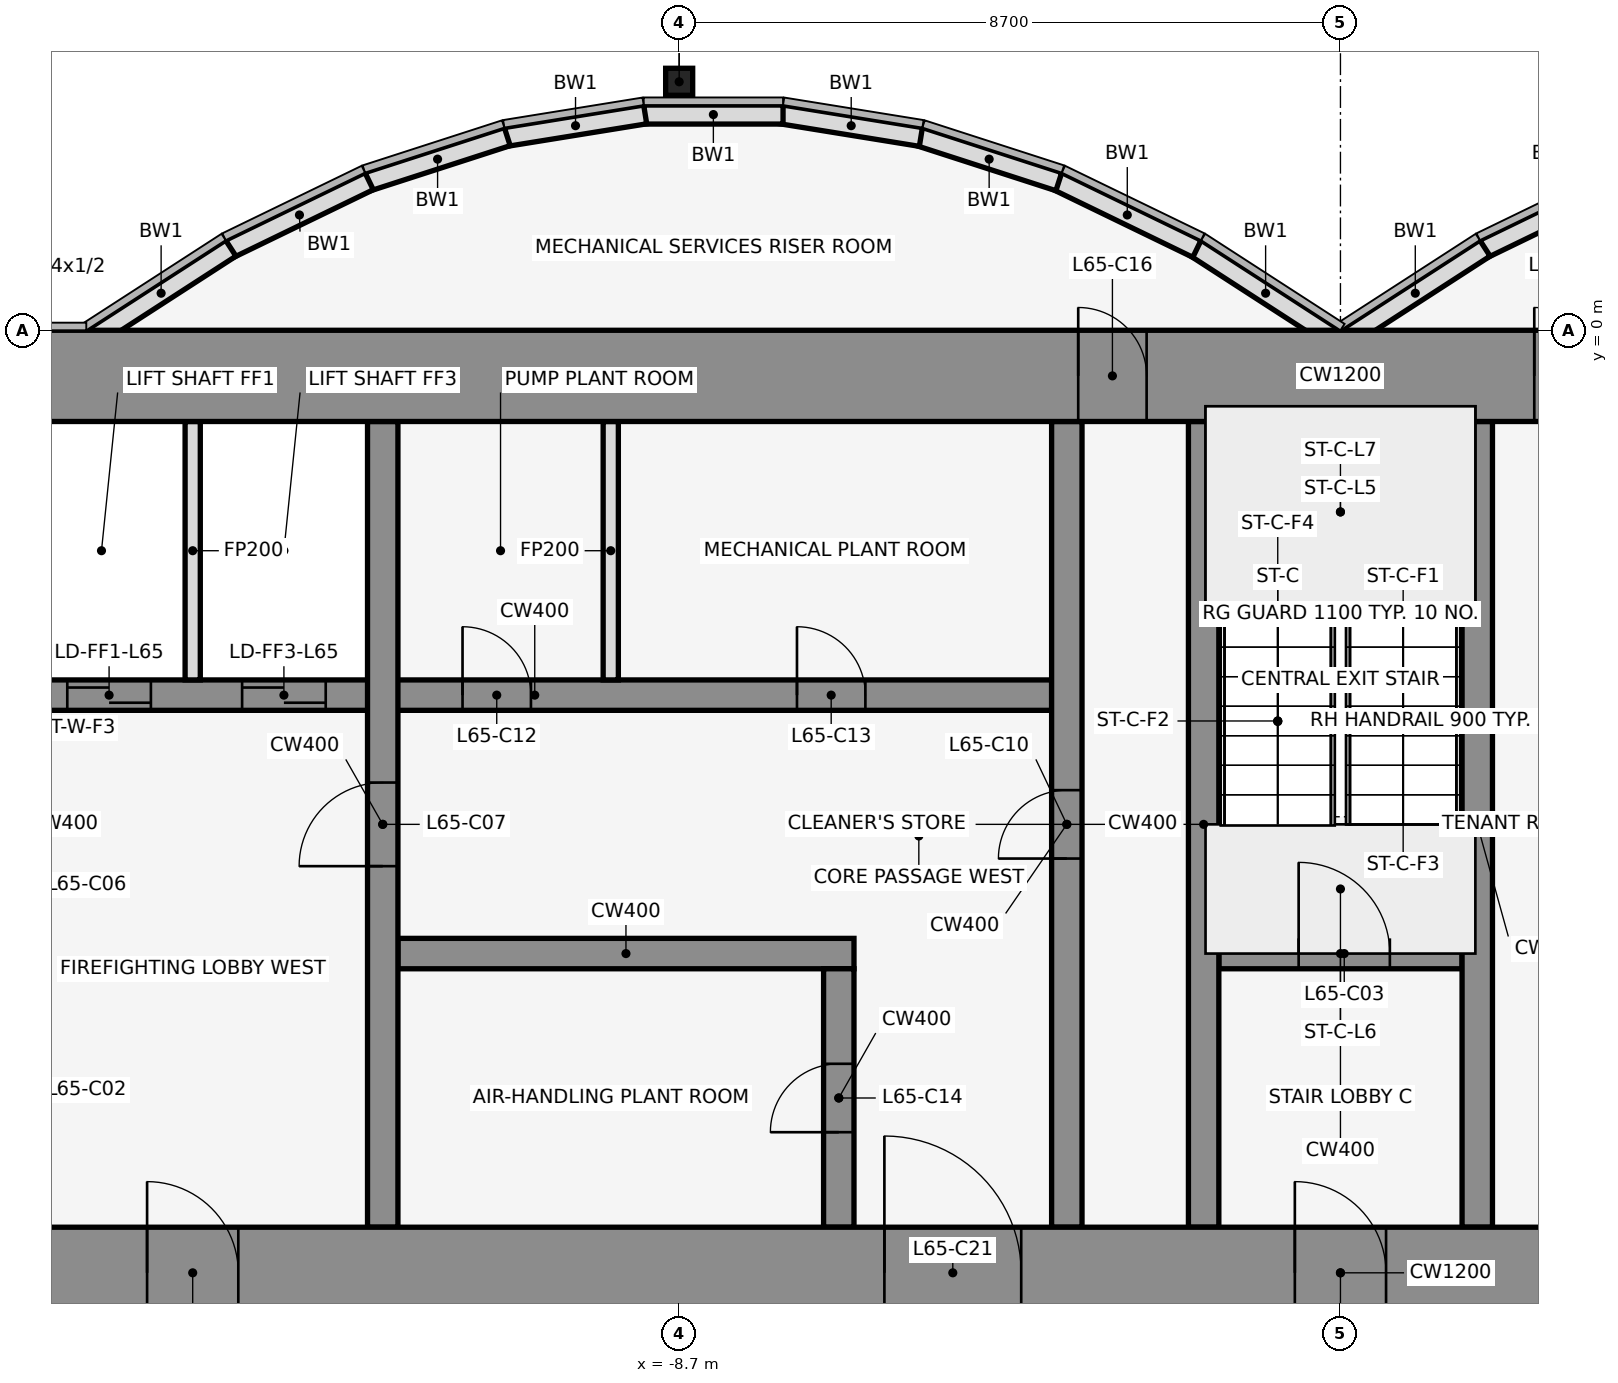
"""IFC4 building model, lengths in metres.
Left out: names, types, materials, properties, quantities, classifications, styles, units other than length and angle.
Written with IfcOpenShell. Run it as: python <this file> out.ifc"""

import sys

from ifc_helpers import new_model, si_unit, direction, frame, frame_2d, origin, origin_2d, place, context, subcontext, project, spatial, rectangle, hollow_rectangle, extrude, element, fill, save


model = new_model("IFC4")
c1 = context("Model", 3, precision=1e-05, world=origin(), true_north=direction((0.0, 1.0)))
c2 = subcontext(c1, "Body", "Model", "MODEL_VIEW")
j1 = project(units=[si_unit("LENGTHUNIT", "METRE"), si_unit("PLANEANGLEUNIT", "RADIAN")], contexts=[c1])
p1 = place(None, origin())
s1 = spatial("IfcSite", under=j1, at=p1, CompositionType="ELEMENT")
p2 = place(p1, origin())
s2 = spatial("IfcBuilding", under=s1, at=p2, CompositionType="ELEMENT")
p3 = place(p2, frame((0.0, 0.0, 287.6)))
s3 = spatial("IfcBuildingStorey", under=s2, at=p3, CompositionType="ELEMENT", Elevation=287.6)
p4 = place(p3, frame((-8.7, 3.269, 0.0), z_axis=(0.0, 0.0, 1.0), x_axis=(1.0, 0.0, 0.0)))
e1 = element("IfcColumn", 1, at=p4, inside=s3, PredefinedType="COLUMN", context=c2, shape_type="SweptSolid", body=[
    extrude(hollow_rectangle(XDim=0.356, YDim=0.356, WallThickness=0.012, at=origin_2d()), origin(), (0.0, 0.0, 1.0), 5.4),
])
p5 = place(p3, frame((3.721, 1.962, 0.0), z_axis=(0.0, 0.0, 1.0), x_axis=(-0.89982408427, -0.436252928206, 0.0)))
e2 = element("IfcWall", 2, at=p5, inside=s3, PredefinedType="STANDARD", context=c2, shape_type="SweptSolid", body=[
    extrude(rectangle(XDim=2.038, YDim=0.25, at=frame_2d((1.019, 0.0))), origin(), (0.0, 0.0, 1.0), 5.25),
])
for number, where, z_axis, x_axis in (
    (3, (1.901, 1.08, 0.0), (0.0, 0.0, 1.0), (-0.84, -0.543, 0.0)),
    (4, (-0.068, -0.105, 0.0), (0.0, 0.0, 1.0), (-0.84, 0.543, 0.0)),
):
    element("IfcWall", number, at=place(p3, frame(where, z_axis=z_axis, x_axis=x_axis)), inside=s3, PredefinedType="STANDARD", context=c2, shape_type="SweptSolid", body=[
        extrude(rectangle(XDim=2.183, YDim=0.25, at=frame_2d((1.091, 0.0))), origin(), (0.0, 0.0, 1.0), 5.25),
    ])
p6 = place(p3, frame((-1.888, 1.073, 0.0), z_axis=(0.0, 0.0, 1.0), x_axis=(-0.89982408427, 0.436252928206, 0.0)))
e5 = element("IfcWall", 5, at=p6, inside=s3, PredefinedType="STANDARD", context=c2, shape_type="SweptSolid", body=[
    extrude(rectangle(XDim=2.038, YDim=0.25, at=frame_2d((1.019, 0.0))), origin(), (0.0, 0.0, 1.0), 5.25),
])
p7 = place(p3, frame((-3.705, 1.955, 0.0), z_axis=(0.0, 0.0, 1.0), x_axis=(-0.951495806175, 0.307661714928, 0.0)))
e6 = element("IfcWall", 6, at=p7, inside=s3, PredefinedType="STANDARD", context=c2, shape_type="SweptSolid", body=[
    extrude(rectangle(XDim=1.927, YDim=0.25, at=frame_2d((0.963, 0.0))), origin(), (0.0, 0.0, 1.0), 5.25),
])
p8 = place(p3, frame((-5.52, 2.543, 0.0), z_axis=(0.0, 0.0, 1.0), x_axis=(-0.987181718931, 0.159600293885, 0.0)))
e7 = element("IfcWall", 7, at=p8, inside=s3, PredefinedType="STANDARD", context=c2, shape_type="SweptSolid", body=[
    extrude(rectangle(XDim=1.857, YDim=0.25, at=frame_2d((0.929, 0.0))), origin(), (0.0, 0.0, 1.0), 5.25),
])
p9 = place(p3, frame((-7.333, 2.838, 0.0), z_axis=(0.0, 0.0, 1.0), x_axis=(-1.0, 0.0, 0.0)))
e8 = element("IfcWall", 8, at=p9, inside=s3, PredefinedType="STANDARD", context=c2, shape_type="SweptSolid", body=[
    extrude(rectangle(XDim=1.833, YDim=0.25, at=frame_2d((0.917, 0.0))), origin(), (0.0, 0.0, 1.0), 5.25),
])
p10 = place(p3, frame((-9.147, 2.84, 0.0), z_axis=(0.0, 0.0, 1.0), x_axis=(-0.987181718931, -0.159600293885, 0.0)))
e9 = element("IfcWall", 9, at=p10, inside=s3, PredefinedType="STANDARD", context=c2, shape_type="SweptSolid", body=[
    extrude(rectangle(XDim=1.857, YDim=0.25, at=frame_2d((0.929, 0.0))), origin(), (0.0, 0.0, 1.0), 5.25),
])
p11 = place(p3, frame((-10.962, 2.548, 0.0), z_axis=(0.0, 0.0, 1.0), x_axis=(-0.951495806175, -0.307661714928, 0.0)))
e10 = element("IfcWall", 10, at=p11, inside=s3, PredefinedType="STANDARD", context=c2, shape_type="SweptSolid", body=[
    extrude(rectangle(XDim=1.927, YDim=0.25, at=frame_2d((0.963, 0.0))), origin(), (0.0, 0.0, 1.0), 5.25),
])
p12 = place(p3, frame((-12.779, 1.962, 0.0), z_axis=(0.0, 0.0, 1.0), x_axis=(-0.89982408427, -0.436252928206, 0.0)))
e11 = element("IfcWall", 11, at=p12, inside=s3, PredefinedType="STANDARD", context=c2, shape_type="SweptSolid", body=[
    extrude(rectangle(XDim=2.038, YDim=0.25, at=frame_2d((1.019, 0.0))), origin(), (0.0, 0.0, 1.0), 5.25),
])
p13 = place(p3, frame((-14.599, 1.08, 0.0), z_axis=(0.0, 0.0, 1.0), x_axis=(-0.83981312244, -0.542875602121, 0.0)))
e12 = element("IfcWall", 12, at=p13, inside=s3, PredefinedType="STANDARD", context=c2, shape_type="SweptSolid", body=[
    extrude(rectangle(XDim=2.183, YDim=0.25, at=frame_2d((1.091, 0.0))), origin(), (0.0, 0.0, 1.0), 5.25),
])
p14 = place(p3, frame((-12.4, -8.2, 0.0), z_axis=(0.0, 0.0, 1.0), x_axis=(1.0, 0.0, 0.0)))
e13 = element("IfcWall", 13, at=p14, inside=s3, PredefinedType="SHEAR", context=c2, shape_type="SweptSolid", body=[
    extrude(rectangle(XDim=6.0, YDim=0.4, at=frame_2d((3.0, 0.0))), origin(), (0.0, 0.0, 1.0), 5.4),
])
p15 = place(p3, frame((-1.6, -8.2, 0.0), z_axis=(0.0, 0.0, 1.0), x_axis=(1.0, 0.0, 0.0)))
e14 = element("IfcWall", 14, at=p15, inside=s3, PredefinedType="SHEAR", context=c2, shape_type="SweptSolid", body=[
    extrude(rectangle(XDim=3.2, YDim=0.4, at=frame_2d((1.6, 0.0))), origin(), (0.0, 0.0, 1.0), 5.4),
])
p16 = place(p15, frame((1.05, 0.0, 0.0)))
e15 = element("IfcOpeningElement", 15, at=p16, cuts=e14, PredefinedType="OPENING", context=c2, shape_type="SweptSolid", body=[
    extrude(rectangle(XDim=1.2, YDim=2.1, at=frame_2d((0.6, 1.05))), frame((0.0, 0.212, 0.0), z_axis=(0.0, -1.0, 0.0), x_axis=(1.0, 0.0, 0.0)), (0.0, 0.0, 1.0), 0.424),
])
p17 = place(p3, frame((-17.4, -4.8, 0.0), z_axis=(0.0, 0.0, 1.0), x_axis=(1.0, 0.0, 0.0)))
e16 = element("IfcWall", 16, at=p17, inside=s3, PredefinedType="SHEAR", context=c2, shape_type="SweptSolid", body=[
    extrude(rectangle(XDim=13.6, YDim=0.4, at=frame_2d((6.8, 0.0))), origin(), (0.0, 0.0, 1.0), 5.4),
])
p18 = place(p17, frame((0.65, 0.0, 0.0)))
e17 = element("IfcOpeningElement", 17, at=p18, cuts=e16, PredefinedType="OPENING", context=c2, shape_type="SweptSolid", body=[
    extrude(rectangle(XDim=1.1, YDim=2.1, at=frame_2d((0.55, 1.05))), frame((0.0, 0.212, 0.0), z_axis=(0.0, -1.0, 0.0), x_axis=(1.0, 0.0, 0.0)), (0.0, 0.0, 1.0), 0.424),
])
p19 = place(p17, frame((2.95, 0.0, 0.0)))
e18 = element("IfcOpeningElement", 18, at=p19, cuts=e16, PredefinedType="OPENING", context=c2, shape_type="SweptSolid", body=[
    extrude(rectangle(XDim=1.1, YDim=2.1, at=frame_2d((0.55, 1.05))), frame((0.0, 0.212, 0.0), z_axis=(0.0, -1.0, 0.0), x_axis=(1.0, 0.0, 0.0)), (0.0, 0.0, 1.0), 0.424),
])
p20 = place(p17, frame((5.85, 0.0, 0.0)))
e19 = element("IfcOpeningElement", 19, at=p20, cuts=e16, PredefinedType="OPENING", context=c2, shape_type="SweptSolid", body=[
    extrude(rectangle(XDim=0.9, YDim=2.1, at=frame_2d((0.45, 1.05))), frame((0.0, 0.212, 0.0), z_axis=(0.0, -1.0, 0.0), x_axis=(1.0, 0.0, 0.0)), (0.0, 0.0, 1.0), 0.424),
])
p21 = place(p17, frame((10.25, 0.0, 0.0)))
e20 = element("IfcOpeningElement", 20, at=p21, cuts=e16, PredefinedType="OPENING", context=c2, shape_type="SweptSolid", body=[
    extrude(rectangle(XDim=0.9, YDim=2.1, at=frame_2d((0.45, 1.05))), frame((0.0, 0.212, 0.0), z_axis=(0.0, -1.0, 0.0), x_axis=(1.0, 0.0, 0.0)), (0.0, 0.0, 1.0), 0.424),
])
p22 = place(p3, frame((-15.1, -4.6, 0.0), z_axis=(0.0, 0.0, 1.0), x_axis=(0.0, 1.0, 0.0)))
e21 = element("IfcWall", 21, at=p22, inside=s3, PredefinedType="PARTITIONING", context=c2, shape_type="SweptSolid", body=[
    extrude(rectangle(XDim=3.4, YDim=0.2, at=frame_2d((1.7, 0.0))), origin(), (0.0, 0.0, 1.0), 4.318),
])
p23 = place(p3, frame((-12.6, -11.8, 0.0), z_axis=(0.0, 0.0, 1.0), x_axis=(0.0, 1.0, 0.0)))
e22 = element("IfcWall", 22, at=p23, inside=s3, PredefinedType="SHEAR", context=c2, shape_type="SweptSolid", body=[
    extrude(rectangle(XDim=10.6, YDim=0.4, at=frame_2d((5.3, 0.0))), origin(), (0.0, 0.0, 1.0), 5.4),
])
p24 = place(p23, frame((4.75, 0.0, 0.0)))
e23 = element("IfcOpeningElement", 23, at=p24, cuts=e22, PredefinedType="OPENING", context=c2, shape_type="SweptSolid", body=[
    extrude(rectangle(XDim=1.1, YDim=2.1, at=frame_2d((0.55, 1.05))), frame((0.0, 0.212, 0.0), z_axis=(0.0, -1.0, 0.0), x_axis=(1.0, 0.0, 0.0)), (0.0, 0.0, 1.0), 0.424),
])
p25 = place(p3, frame((-9.6, -4.6, 0.0), z_axis=(0.0, 0.0, 1.0), x_axis=(0.0, 1.0, 0.0)))
e24 = element("IfcWall", 24, at=p25, inside=s3, PredefinedType="PARTITIONING", context=c2, shape_type="SweptSolid", body=[
    extrude(rectangle(XDim=3.4, YDim=0.2, at=frame_2d((1.7, 0.0))), origin(), (0.0, 0.0, 1.0), 4.318),
])
p26 = place(p3, frame((-6.6, -11.8, 0.0), z_axis=(0.0, 0.0, 1.0), x_axis=(0.0, 1.0, 0.0)))
e25 = element("IfcWall", 25, at=p26, inside=s3, PredefinedType="SHEAR", context=c2, shape_type="SweptSolid", body=[
    extrude(rectangle(XDim=3.4, YDim=0.4, at=frame_2d((1.7, 0.0))), origin(), (0.0, 0.0, 1.0), 5.4),
])
p27 = place(p26, frame((1.25, 0.0, 0.0)))
e26 = element("IfcOpeningElement", 26, at=p27, cuts=e25, PredefinedType="OPENING", context=c2, shape_type="SweptSolid", body=[
    extrude(rectangle(XDim=0.9, YDim=2.1, at=frame_2d((0.45, 1.05))), frame((0.0, 0.212, 0.0), z_axis=(0.0, -1.0, 0.0), x_axis=(1.0, 0.0, 0.0)), (0.0, 0.0, 1.0), 0.424),
])
p28 = place(p3, frame((-3.6, -11.8, 0.0), z_axis=(0.0, 0.0, 1.0), x_axis=(0.0, 1.0, 0.0)))
e27 = element("IfcWall", 27, at=p28, inside=s3, PredefinedType="SHEAR", context=c2, shape_type="SweptSolid", body=[
    extrude(rectangle(XDim=10.6, YDim=0.4, at=frame_2d((5.3, 0.0))), origin(), (0.0, 0.0, 1.0), 5.4),
])
p29 = place(p28, frame((4.85, 0.0, 0.0)))
e28 = element("IfcOpeningElement", 28, at=p29, cuts=e27, PredefinedType="OPENING", context=c2, shape_type="SweptSolid", body=[
    extrude(rectangle(XDim=0.9, YDim=2.1, at=frame_2d((0.45, 1.05))), frame((0.0, 0.212, 0.0), z_axis=(0.0, -1.0, 0.0), x_axis=(1.0, 0.0, 0.0)), (0.0, 0.0, 1.0), 0.424),
])
for number, where, z_axis, x_axis in (
    (29, (-1.8, -11.8, 0.0), (0.0, 0.0, 1.0), (0.0, 1.0, 0.0)),
    (30, (1.8, -11.8, 0.0), (0.0, 0.0, 1.0), (0.0, 1.0, 0.0)),
):
    element("IfcWall", number, at=place(p3, frame(where, z_axis=z_axis, x_axis=x_axis)), inside=s3, PredefinedType="SHEAR", context=c2, shape_type="SweptSolid", body=[
        extrude(rectangle(XDim=10.6, YDim=0.4, at=frame_2d((5.3, 0.0))), origin(), (0.0, 0.0, 1.0), 5.4),
    ])
p30 = place(p3, frame((-22.0, -0.6, 0.0), z_axis=(0.0, 0.0, 1.0), x_axis=(1.0, 0.0, 0.0)))
e31 = element("IfcWall", 31, at=p30, inside=s3, PredefinedType="SHEAR", context=c2, shape_type="SweptSolid", body=[
    extrude(rectangle(XDim=44.0, YDim=1.2, at=frame_2d((22.0, 0.0))), origin(), (0.0, 0.0, 1.0), 5.4),
])
p31 = place(p30, frame((18.55, 0.0, 0.0)))
e32 = element("IfcOpeningElement", 32, at=p31, cuts=e31, PredefinedType="OPENING", context=c2, shape_type="SweptSolid", body=[
    extrude(rectangle(XDim=0.9, YDim=2.1, at=frame_2d((0.45, 1.05))), frame((0.0, 0.612, 0.0), z_axis=(0.0, -1.0, 0.0), x_axis=(1.0, 0.0, 0.0)), (0.0, 0.0, 1.0), 1.224),
])
p32 = place(p30, frame((24.55, 0.0, 0.0)))
e33 = element("IfcOpeningElement", 33, at=p32, cuts=e31, PredefinedType="OPENING", context=c2, shape_type="SweptSolid", body=[
    extrude(rectangle(XDim=0.9, YDim=2.1, at=frame_2d((0.45, 1.05))), frame((0.0, 0.612, 0.0), z_axis=(0.0, -1.0, 0.0), x_axis=(1.0, 0.0, 0.0)), (0.0, 0.0, 1.0), 1.224),
])
p33 = place(p3, frame((-22.0, -12.4, 0.0), z_axis=(0.0, 0.0, 1.0), x_axis=(1.0, 0.0, 0.0)))
e34 = element("IfcWall", 34, at=p33, inside=s3, PredefinedType="SHEAR", context=c2, shape_type="SweptSolid", body=[
    extrude(rectangle(XDim=44.0, YDim=1.2, at=frame_2d((22.0, 0.0))), origin(), (0.0, 0.0, 1.0), 5.4),
])
p34 = place(p33, frame((2.2, 0.0, 0.0)))
e35 = element("IfcOpeningElement", 35, at=p34, cuts=e34, PredefinedType="OPENING", context=c2, shape_type="SweptSolid", body=[
    extrude(rectangle(XDim=1.2, YDim=2.1, at=frame_2d((0.6, 1.05))), frame((0.0, 0.612, 0.0), z_axis=(0.0, -1.0, 0.0), x_axis=(1.0, 0.0, 0.0)), (0.0, 0.0, 1.0), 1.224),
])
p35 = place(p33, frame((21.4, 0.0, 0.0)))
e36 = element("IfcOpeningElement", 36, at=p35, cuts=e34, PredefinedType="OPENING", context=c2, shape_type="SweptSolid", body=[
    extrude(rectangle(XDim=1.2, YDim=2.1, at=frame_2d((0.6, 1.05))), frame((0.0, 0.612, 0.0), z_axis=(0.0, -1.0, 0.0), x_axis=(1.0, 0.0, 0.0)), (0.0, 0.0, 1.0), 1.224),
])
p36 = place(p33, frame((40.6, 0.0, 0.0)))
e37 = element("IfcOpeningElement", 37, at=p36, cuts=e34, PredefinedType="OPENING", context=c2, shape_type="SweptSolid", body=[
    extrude(rectangle(XDim=1.2, YDim=2.1, at=frame_2d((0.6, 1.05))), frame((0.0, 0.612, 0.0), z_axis=(0.0, -1.0, 0.0), x_axis=(1.0, 0.0, 0.0)), (0.0, 0.0, 1.0), 1.224),
])
p37 = place(p33, frame((16.0, 0.0, 0.0)))
e38 = element("IfcOpeningElement", 38, at=p37, cuts=e34, PredefinedType="OPENING", context=c2, shape_type="SweptSolid", body=[
    extrude(rectangle(XDim=1.8, YDim=2.1, at=frame_2d((0.9, 1.05))), frame((0.0, 0.612, 0.0), z_axis=(0.0, -1.0, 0.0), x_axis=(1.0, 0.0, 0.0)), (0.0, 0.0, 1.0), 1.224),
])
p38 = place(p33, frame((6.3, 0.0, 0.0)))
e39 = element("IfcOpeningElement", 39, at=p38, cuts=e34, PredefinedType="OPENING", context=c2, shape_type="SweptSolid", body=[
    extrude(rectangle(XDim=1.2, YDim=2.1, at=frame_2d((0.6, 1.05))), frame((0.0, 0.612, 0.0), z_axis=(0.0, -1.0, 0.0), x_axis=(1.0, 0.0, 0.0)), (0.0, 0.0, 1.0), 1.224),
])
p39 = place(p33, frame((26.2, 0.0, 0.0)))
e40 = element("IfcOpeningElement", 40, at=p39, cuts=e34, PredefinedType="OPENING", context=c2, shape_type="SweptSolid", body=[
    extrude(rectangle(XDim=1.8, YDim=2.1, at=frame_2d((0.9, 1.05))), frame((0.0, 0.612, 0.0), z_axis=(0.0, -1.0, 0.0), x_axis=(1.0, 0.0, 0.0)), (0.0, 0.0, 1.0), 1.224),
])
p40 = place(p33, frame((36.5, 0.0, 0.0)))
e41 = element("IfcOpeningElement", 41, at=p40, cuts=e34, PredefinedType="OPENING", context=c2, shape_type="SweptSolid", body=[
    extrude(rectangle(XDim=1.2, YDim=2.1, at=frame_2d((0.6, 1.05))), frame((0.0, 0.612, 0.0), z_axis=(0.0, -1.0, 0.0), x_axis=(1.0, 0.0, 0.0)), (0.0, 0.0, 1.0), 1.224),
])
p41 = place(p16, origin())
e42 = element("IfcDoor", 42, at=p41, inside=s3, OperationType="SINGLE_SWING_LEFT", PredefinedType="DOOR", context=c2, shape_type="SweptSolid", body=[
    extrude(rectangle(XDim=1.2, YDim=2.1, at=frame_2d((0.6, 1.05))), frame((0.0, 0.025, 0.0), z_axis=(0.0, -1.0, 0.0), x_axis=(1.0, 0.0, 0.0)), (0.0, 0.0, 1.0), 0.05),
])
fill(e15, e42)
p42 = place(p18, origin())
e43 = element("IfcDoor", 43, at=p42, inside=s3, OperationType="DOUBLE_DOOR_SLIDING", PredefinedType="DOOR", context=c2, shape_type="SweptSolid", body=[
    extrude(rectangle(XDim=1.1, YDim=2.1, at=frame_2d((0.55, 1.05))), frame((0.0, 0.025, 0.0), z_axis=(0.0, -1.0, 0.0), x_axis=(1.0, 0.0, 0.0)), (0.0, 0.0, 1.0), 0.05),
])
fill(e17, e43)
p43 = place(p19, origin())
e44 = element("IfcDoor", 44, at=p43, inside=s3, OperationType="DOUBLE_DOOR_SLIDING", PredefinedType="DOOR", context=c2, shape_type="SweptSolid", body=[
    extrude(rectangle(XDim=1.1, YDim=2.1, at=frame_2d((0.55, 1.05))), frame((0.0, 0.025, 0.0), z_axis=(0.0, -1.0, 0.0), x_axis=(1.0, 0.0, 0.0)), (0.0, 0.0, 1.0), 0.05),
])
fill(e18, e44)
p44 = place(p24, origin())
e45 = element("IfcDoor", 45, at=p44, inside=s3, OperationType="SINGLE_SWING_LEFT", PredefinedType="DOOR", context=c2, shape_type="SweptSolid", body=[
    extrude(rectangle(XDim=1.1, YDim=2.1, at=frame_2d((0.55, 1.05))), frame((0.0, 0.025, 0.0), z_axis=(0.0, -1.0, 0.0), x_axis=(1.0, 0.0, 0.0)), (0.0, 0.0, 1.0), 0.05),
])
fill(e23, e45)
p45 = place(p29, frame((0.9, 0.0, 0.0), z_axis=(0.0, 0.0, 1.0), x_axis=(-1.0, 0.0, 0.0)))
e46 = element("IfcDoor", 46, at=p45, inside=s3, OperationType="SINGLE_SWING_LEFT", PredefinedType="DOOR", context=c2, shape_type="SweptSolid", body=[
    extrude(rectangle(XDim=0.9, YDim=2.1, at=frame_2d((0.45, 1.05))), frame((0.0, 0.025, 0.0), z_axis=(0.0, -1.0, 0.0), x_axis=(1.0, 0.0, 0.0)), (0.0, 0.0, 1.0), 0.05),
])
fill(e28, e46)
p46 = place(p20, origin())
e47 = element("IfcDoor", 47, at=p46, inside=s3, OperationType="SINGLE_SWING_RIGHT", PredefinedType="DOOR", context=c2, shape_type="SweptSolid", body=[
    extrude(rectangle(XDim=0.9, YDim=2.1, at=frame_2d((0.45, 1.05))), frame((0.0, 0.025, 0.0), z_axis=(0.0, -1.0, 0.0), x_axis=(1.0, 0.0, 0.0)), (0.0, 0.0, 1.0), 0.05),
])
fill(e19, e47)
p47 = place(p21, origin())
e48 = element("IfcDoor", 48, at=p47, inside=s3, OperationType="SINGLE_SWING_LEFT", PredefinedType="DOOR", context=c2, shape_type="SweptSolid", body=[
    extrude(rectangle(XDim=0.9, YDim=2.1, at=frame_2d((0.45, 1.05))), frame((0.0, 0.025, 0.0), z_axis=(0.0, -1.0, 0.0), x_axis=(1.0, 0.0, 0.0)), (0.0, 0.0, 1.0), 0.05),
])
fill(e20, e48)
p48 = place(p27, origin())
e49 = element("IfcDoor", 49, at=p48, inside=s3, OperationType="SINGLE_SWING_RIGHT", PredefinedType="DOOR", context=c2, shape_type="SweptSolid", body=[
    extrude(rectangle(XDim=0.9, YDim=2.1, at=frame_2d((0.45, 1.05))), frame((0.0, 0.025, 0.0), z_axis=(0.0, -1.0, 0.0), x_axis=(1.0, 0.0, 0.0)), (0.0, 0.0, 1.0), 0.05),
])
fill(e26, e49)
p49 = place(p31, origin())
e50 = element("IfcDoor", 50, at=p49, inside=s3, OperationType="SINGLE_SWING_LEFT", PredefinedType="DOOR", context=c2, shape_type="SweptSolid", body=[
    extrude(rectangle(XDim=0.9, YDim=2.1, at=frame_2d((0.45, 1.05))), frame((0.0, 0.025, 0.0), z_axis=(0.0, -1.0, 0.0), x_axis=(1.0, 0.0, 0.0)), (0.0, 0.0, 1.0), 0.05),
])
fill(e32, e50)
p50 = place(p32, origin())
e51 = element("IfcDoor", 51, at=p50, inside=s3, OperationType="SINGLE_SWING_LEFT", PredefinedType="DOOR", context=c2, shape_type="SweptSolid", body=[
    extrude(rectangle(XDim=0.9, YDim=2.1, at=frame_2d((0.45, 1.05))), frame((0.0, 0.025, 0.0), z_axis=(0.0, -1.0, 0.0), x_axis=(1.0, 0.0, 0.0)), (0.0, 0.0, 1.0), 0.05),
])
fill(e33, e51)
p51 = place(p35, frame((1.2, 0.0, 0.0), z_axis=(0.0, 0.0, 1.0), x_axis=(-1.0, 0.0, 0.0)))
e52 = element("IfcDoor", 52, at=p51, inside=s3, OperationType="SINGLE_SWING_RIGHT", PredefinedType="DOOR", context=c2, shape_type="SweptSolid", body=[
    extrude(rectangle(XDim=1.2, YDim=2.1, at=frame_2d((0.6, 1.05))), frame((0.0, 0.025, 0.0), z_axis=(0.0, -1.0, 0.0), x_axis=(1.0, 0.0, 0.0)), (0.0, 0.0, 1.0), 0.05),
])
fill(e36, e52)
p52 = place(p37, origin())
e53 = element("IfcDoor", 53, at=p52, inside=s3, OperationType="SINGLE_SWING_LEFT", PredefinedType="DOOR", context=c2, shape_type="SweptSolid", body=[
    extrude(rectangle(XDim=1.8, YDim=2.1, at=frame_2d((0.9, 1.05))), frame((0.0, 0.025, 0.0), z_axis=(0.0, -1.0, 0.0), x_axis=(1.0, 0.0, 0.0)), (0.0, 0.0, 1.0), 0.05),
])
fill(e38, e53)
p53 = place(p38, frame((1.2, 0.0, 0.0), z_axis=(0.0, 0.0, 1.0), x_axis=(-1.0, 0.0, 0.0)))
e54 = element("IfcDoor", 54, at=p53, inside=s3, OperationType="SINGLE_SWING_RIGHT", PredefinedType="DOOR", context=c2, shape_type="SweptSolid", body=[
    extrude(rectangle(XDim=1.2, YDim=2.1, at=frame_2d((0.6, 1.05))), frame((0.0, 0.025, 0.0), z_axis=(0.0, -1.0, 0.0), x_axis=(1.0, 0.0, 0.0)), (0.0, 0.0, 1.0), 0.05),
])
fill(e39, e54)
save(model, sys.argv[1])
